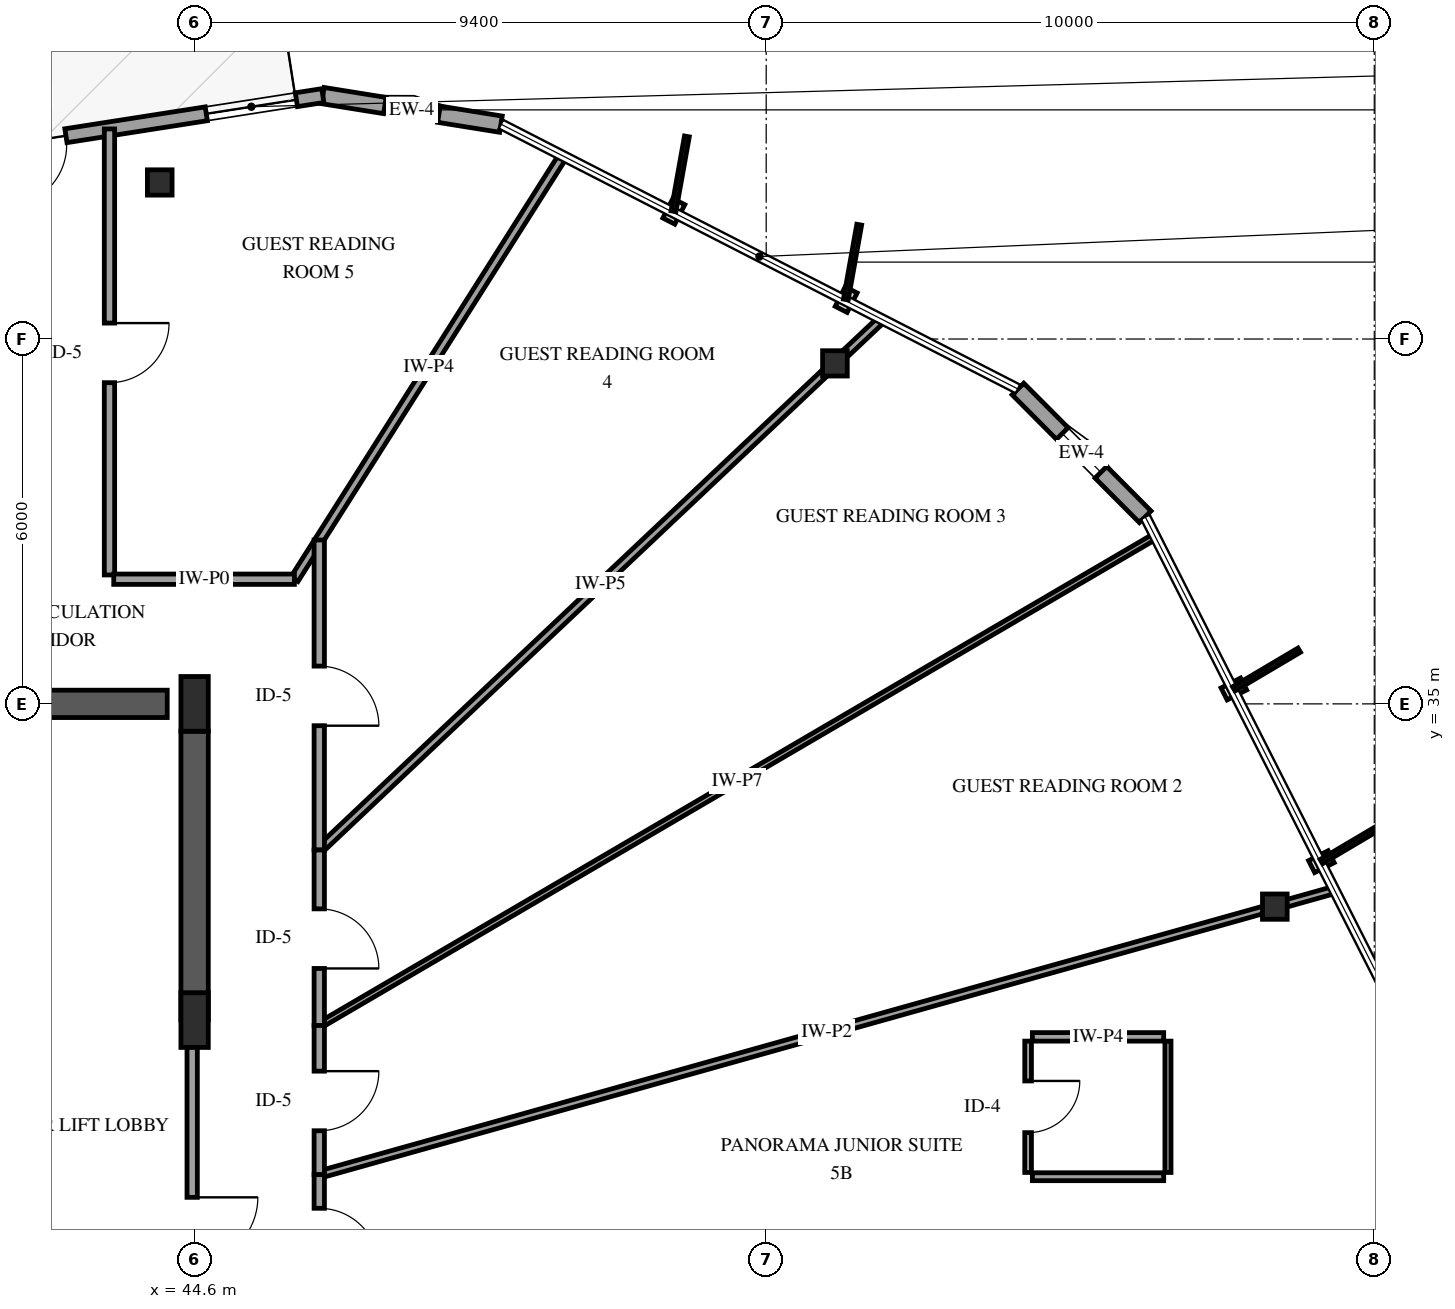
"""IFC4 building model, lengths in metres.
Left out: names, types, materials, properties, quantities, classifications, styles, units other than length and angle.
Written with IfcOpenShell. Run it as: python <this file> out.ifc"""

import sys

from ifc_helpers import new_model, si_unit, direction, frame, frame_2d, origin, origin_2d, place, context, subcontext, project, spatial, rectangle, i_section, extrude, element, fill, save


model = new_model("IFC4")
c1 = context("Model", 3, precision=1e-05, world=origin(), true_north=direction((0.0, 1.0)))
c2 = subcontext(c1, "Body", "Model", "MODEL_VIEW")
j1 = project(units=[si_unit("LENGTHUNIT", "METRE"), si_unit("PLANEANGLEUNIT", "RADIAN")], contexts=[c1])
p1 = place(None, origin())
s1 = spatial("IfcSite", under=j1, at=p1, CompositionType="ELEMENT")
p2 = place(p1, origin())
s2 = spatial("IfcBuilding", under=s1, at=p2, CompositionType="ELEMENT")
p3 = place(p2, frame((0.0, 0.0, 197.8)))
s3 = spatial("IfcBuildingStorey", under=s2, at=p3, CompositionType="ELEMENT", Elevation=197.8)
p4 = place(p3, frame((41.3, 35.0, 0.0), z_axis=(0.0, 0.0, 1.0), x_axis=(1.0, 0.0, 0.0)))
e1 = element("IfcWall", 1, at=p4, inside=s3, PredefinedType="SHEAR", context=c2, shape_type="SweptSolid", body=[
    extrude(rectangle(XDim=2.85, YDim=0.45, at=frame_2d((1.425, 0.0))), origin(), (0.0, 0.0, 1.0), 3.6),
])
p5 = place(p3, frame((44.6, 29.8, 0.0), z_axis=(0.0, 0.0, 1.0), x_axis=(0.0, 1.0, 0.0)))
e2 = element("IfcWall", 2, at=p5, inside=s3, PredefinedType="SHEAR", context=c2, shape_type="SweptSolid", body=[
    extrude(rectangle(XDim=4.75, YDim=0.45, at=frame_2d((2.375, 0.0))), origin(), (0.0, 0.0, 1.0), 3.6),
])
for number, where, z_axis, x_axis in (
    (3, (44.6, 29.8, 0.0), (0.0, 0.0, 1.0), (1.0, 0.0, 0.0)),
    (4, (44.6, 35.0, 0.0), (0.0, 0.0, 1.0), (1.0, 0.0, 0.0)),
):
    element("IfcColumn", number, at=place(p3, frame(where, z_axis=z_axis, x_axis=x_axis)), inside=s3, PredefinedType="PILASTER", context=c2, shape_type="SweptSolid", body=[
        extrude(rectangle(XDim=0.45, YDim=0.9, at=origin_2d()), origin(), (0.0, 0.0, 1.0), 3.6),
    ])
for number, where, z_axis, x_axis in (
    (5, (62.365, 31.666, 0.0), (0.0, 0.0, 1.0), (1.0, 0.0, 0.0)),
    (6, (55.13, 40.599, 0.0), (0.0, 0.0, 1.0), (1.0, 0.0, 0.0)),
    (7, (44.027, 43.574, 0.0), (0.0, 0.0, 1.0), (1.0, 0.0, 0.0)),
):
    element("IfcColumn", number, at=place(p3, frame(where, z_axis=z_axis, x_axis=x_axis)), inside=s3, PredefinedType="COLUMN", context=c2, shape_type="SweptSolid", body=[
        extrude(i_section(OverallWidth=0.406, OverallDepth=0.416, WebThickness=0.03, FlangeThickness=0.048, FilletRadius=0.038, at=origin_2d()), origin(), (0.0, 0.0, 1.0), 3.6),
    ])
p6 = place(p3, frame((49.638, 44.533, 0.0), z_axis=(0.0, 0.0, 1.0), x_axis=(-0.987357295895, 0.158510473609, 0.0)))
e8 = element("IfcWall", 8, at=p6, inside=s3, PredefinedType="SOLIDWALL", context=c2, shape_type="SweptSolid", body=[
    extrude(rectangle(XDim=2.967, YDim=0.27, at=frame_2d((1.483, 0.0))), origin(), (0.0, 0.0, 1.0), 2.679),
])
p7 = place(p6, frame((1.033, 0.0, 0.75)))
e9 = element("IfcOpeningElement", 9, at=p7, cuts=e8, PredefinedType="OPENING", context=c2, shape_type="SweptSolid", body=[
    extrude(rectangle(XDim=0.9, YDim=1.5, at=frame_2d((0.45, 0.75))), frame((0.0, 0.145, 0.0), z_axis=(0.0, -1.0, 0.0), x_axis=(1.0, 0.0, 0.0)), (0.0, 0.0, 1.0), 0.29),
])
p8 = place(p3, frame((46.709, 45.003, 0.0), z_axis=(0.0, 0.0, 1.0), x_axis=(-0.988013251918, -0.154369083801, 0.0)))
e10 = element("IfcWall", 10, at=p8, inside=s3, PredefinedType="SOLIDWALL", context=c2, shape_type="SweptSolid", body=[
    extrude(rectangle(XDim=9.552, YDim=0.23, at=frame_2d((4.776, 0.0))), origin(), (0.0, 0.0, 1.0), 2.679),
])
p9 = place(p8, frame((4.276, 0.0, 0.0)))
e11 = element("IfcOpeningElement", 11, at=p9, cuts=e10, PredefinedType="OPENING", context=c2, shape_type="SweptSolid", body=[
    extrude(rectangle(XDim=1.0, YDim=2.15, at=frame_2d((0.5, 1.075))), frame((0.0, 0.125, 0.0), z_axis=(0.0, -1.0, 0.0), x_axis=(1.0, 0.0, 0.0)), (0.0, 0.0, 1.0), 0.25),
])
p10 = place(p8, frame((0.44, 0.0, 0.72)))
e12 = element("IfcOpeningElement", 12, at=p10, cuts=e10, PredefinedType="OPENING", context=c2, shape_type="SweptSolid", body=[
    extrude(rectangle(XDim=1.5, YDim=1.7, at=frame_2d((0.75, 0.85))), frame((0.0, 0.125, 0.0), z_axis=(0.0, -1.0, 0.0), x_axis=(1.0, 0.0, 0.0)), (0.0, 0.0, 1.0), 0.25),
])
p11 = place(p8, frame((6.058, 0.0, 0.72)))
e13 = element("IfcOpeningElement", 13, at=p11, cuts=e10, PredefinedType="OPENING", context=c2, shape_type="SweptSolid", body=[
    extrude(rectangle(XDim=1.5, YDim=1.7, at=frame_2d((0.75, 0.85))), frame((0.0, 0.125, 0.0), z_axis=(0.0, -1.0, 0.0), x_axis=(1.0, 0.0, 0.0)), (0.0, 0.0, 1.0), 0.25),
])
p12 = place(p3, frame((63.496, 17.193, 0.0), z_axis=(0.0, 0.0, 1.0), x_axis=(0.158485894053, 0.987361241586, 0.0)))
e14 = element("IfcWall", 14, at=p12, inside=s3, PredefinedType="SOLIDWALL", context=c2, shape_type="SweptSolid", body=[
    extrude(rectangle(XDim=9.552, YDim=0.23, at=frame_2d((4.776, 0.0))), origin(), (0.0, 0.0, 1.0), 2.679),
])
p13 = place(p12, frame((4.276, 0.0, 0.0)))
e15 = element("IfcOpeningElement", 15, at=p13, cuts=e14, PredefinedType="OPENING", context=c2, shape_type="SweptSolid", body=[
    extrude(rectangle(XDim=1.0, YDim=2.15, at=frame_2d((0.5, 1.075))), frame((0.0, 0.125, 0.0), z_axis=(0.0, -1.0, 0.0), x_axis=(1.0, 0.0, 0.0)), (0.0, 0.0, 1.0), 0.25),
])
p14 = place(p12, frame((0.44, 0.0, 0.72)))
e16 = element("IfcOpeningElement", 16, at=p14, cuts=e14, PredefinedType="OPENING", context=c2, shape_type="SweptSolid", body=[
    extrude(rectangle(XDim=1.5, YDim=1.7, at=frame_2d((0.75, 0.85))), frame((0.0, 0.125, 0.0), z_axis=(0.0, -1.0, 0.0), x_axis=(1.0, 0.0, 0.0)), (0.0, 0.0, 1.0), 0.25),
])
p15 = place(p12, frame((5.916, 0.0, 0.72)))
e17 = element("IfcOpeningElement", 17, at=p15, cuts=e14, PredefinedType="OPENING", context=c2, shape_type="SweptSolid", body=[
    extrude(rectangle(XDim=1.5, YDim=1.7, at=frame_2d((0.75, 0.85))), frame((0.0, 0.125, 0.0), z_axis=(0.0, -1.0, 0.0), x_axis=(1.0, 0.0, 0.0)), (0.0, 0.0, 1.0), 0.25),
])
p16 = place(p3, frame((60.233, 38.076, 0.0), z_axis=(0.0, 0.0, 1.0), x_axis=(-0.705623863774, 0.708586595183, 0.0)))
e18 = element("IfcWall", 18, at=p16, inside=s3, PredefinedType="SOLIDWALL", context=c2, shape_type="SweptSolid", body=[
    extrude(rectangle(XDim=2.967, YDim=0.27, at=frame_2d((1.483, 0.0))), origin(), (0.0, 0.0, 1.0), 2.679),
])
p17 = place(p16, frame((1.033, 0.0, 0.75)))
e19 = element("IfcOpeningElement", 19, at=p17, cuts=e18, PredefinedType="OPENING", context=c2, shape_type="SweptSolid", body=[
    extrude(rectangle(XDim=0.9, YDim=1.5, at=frame_2d((0.45, 0.75))), frame((0.0, 0.145, 0.0), z_axis=(0.0, -1.0, 0.0), x_axis=(1.0, 0.0, 0.0)), (0.0, 0.0, 1.0), 0.29),
])
p18 = place(p3, frame((46.65, 27.258, 0.0), z_axis=(0.0, 0.0, 1.0), x_axis=(0.962851035854, 0.270033114181, 0.0)))
e20 = element("IfcWall", 20, at=p18, inside=s3, PredefinedType="PARTITIONING", context=c2, shape_type="SweptSolid", body=[
    extrude(rectangle(XDim=17.338, YDim=0.12, at=frame_2d((8.669, 0.0))), origin(), (0.0, 0.0, 1.0), 3.3),
])
p19 = place(p3, frame((46.65, 29.711, 0.0), z_axis=(0.0, 0.0, 1.0), x_axis=(0.863084226083, 0.505060014936, 0.0)))
e21 = element("IfcWall", 21, at=p19, inside=s3, PredefinedType="PARTITIONING", context=c2, shape_type="SweptSolid", body=[
    extrude(rectangle(XDim=15.927, YDim=0.1, at=frame_2d((7.963, 0.0))), origin(), (0.0, 0.0, 1.0), 3.3),
])
p20 = place(p3, frame((46.65, 32.597, 0.0), z_axis=(0.0, 0.0, 1.0), x_axis=(0.727292042889, 0.68632811712, 0.0)))
e22 = element("IfcWall", 22, at=p20, inside=s3, PredefinedType="PARTITIONING", context=c2, shape_type="SweptSolid", body=[
    extrude(rectangle(XDim=12.719, YDim=0.13, at=frame_2d((6.359, 0.0))), origin(), (0.0, 0.0, 1.0), 2.595),
])
p21 = place(p3, frame((46.241, 37.05, 0.0), z_axis=(0.0, 0.0, 1.0), x_axis=(0.535694507072, 0.844411863425, 0.0)))
e23 = element("IfcWall", 23, at=p21, inside=s3, PredefinedType="PARTITIONING", context=c2, shape_type="SweptSolid", body=[
    extrude(rectangle(XDim=8.244, YDim=0.14, at=frame_2d((4.122, 0.0))), origin(), (0.0, 0.0, 1.0), 3.3),
])
p22 = place(p3, frame((43.2, 44.455, 0.0), z_axis=(0.0, 0.0, 1.0), x_axis=(0.0, -1.0, 0.0)))
e24 = element("IfcWall", 24, at=p22, inside=s3, PredefinedType="PARTITIONING", context=c2, shape_type="SweptSolid", body=[
    extrude(rectangle(XDim=7.335, YDim=0.17, at=frame_2d((3.667, 0.0))), origin(), (0.0, 0.0, 1.0), 2.595),
])
p23 = place(p22, frame((3.193, 0.0, 0.0)))
e25 = element("IfcOpeningElement", 25, at=p23, cuts=e24, PredefinedType="OPENING", context=c2, shape_type="SweptSolid", body=[
    extrude(rectangle(XDim=0.98, YDim=2.15, at=frame_2d((0.49, 1.075))), frame((0.0, 0.095, 0.0), z_axis=(0.0, -1.0, 0.0), x_axis=(1.0, 0.0, 0.0)), (0.0, 0.0, 1.0), 0.19),
])
p24 = place(p3, frame((44.56, 29.8, 0.0), z_axis=(0.0, 0.0, 1.0), x_axis=(0.0, -1.0, 0.0)))
e26 = element("IfcWall", 26, at=p24, inside=s3, PredefinedType="PARTITIONING", context=c2, shape_type="SweptSolid", body=[
    extrude(rectangle(XDim=6.91, YDim=0.17, at=frame_2d((3.455, 0.0))), origin(), (0.0, 0.0, 1.0), 2.34),
])
p25 = place(p24, frame((2.915, 0.0, 0.0)))
e27 = element("IfcOpeningElement", 27, at=p25, cuts=e26, PredefinedType="OPENING", context=c2, shape_type="SweptSolid", body=[
    extrude(rectangle(XDim=1.08, YDim=2.15, at=frame_2d((0.54, 1.075))), frame((0.0, 0.095, 0.0), z_axis=(0.0, -1.0, 0.0), x_axis=(1.0, 0.0, 0.0)), (0.0, 0.0, 1.0), 0.19),
])
p26 = place(p3, frame((46.65, 37.695, 0.0), z_axis=(0.0, 0.0, 1.0), x_axis=(0.0, -1.0, 0.0)))
e28 = element("IfcWall", 28, at=p26, inside=s3, PredefinedType="PARTITIONING", context=c2, shape_type="SweptSolid", body=[
    extrude(rectangle(XDim=5.098, YDim=0.17, at=frame_2d((2.549, 0.0))), origin(), (0.0, 0.0, 1.0), 3.3),
])
p27 = place(p26, frame((2.074, 0.0, 0.0)))
e29 = element("IfcOpeningElement", 29, at=p27, cuts=e28, PredefinedType="OPENING", context=c2, shape_type="SweptSolid", body=[
    extrude(rectangle(XDim=0.98, YDim=2.15, at=frame_2d((0.49, 1.075))), frame((0.0, 0.095, 0.0), z_axis=(0.0, -1.0, 0.0), x_axis=(1.0, 0.0, 0.0)), (0.0, 0.0, 1.0), 0.19),
])
p28 = place(p3, frame((43.27, 37.05, 0.0), z_axis=(0.0, 0.0, 1.0), x_axis=(1.0, 0.0, 0.0)))
e30 = element("IfcWall", 30, at=p28, inside=s3, PredefinedType="PARTITIONING", context=c2, shape_type="SweptSolid", body=[
    extrude(rectangle(XDim=2.971, YDim=0.17, at=frame_2d((1.485, 0.0))), origin(), (0.0, 0.0, 1.0), 3.3),
])
p29 = place(p3, frame((46.65, 32.597, 0.0), z_axis=(0.0, 0.0, 1.0), x_axis=(0.0, -1.0, 0.0)))
e31 = element("IfcWall", 31, at=p29, inside=s3, PredefinedType="PARTITIONING", context=c2, shape_type="SweptSolid", body=[
    extrude(rectangle(XDim=2.886, YDim=0.17, at=frame_2d((1.443, 0.0))), origin(), (0.0, 0.0, 1.0), 3.3),
])
p30 = place(p29, frame((0.968, 0.0, 0.0)))
e32 = element("IfcOpeningElement", 32, at=p30, cuts=e31, PredefinedType="OPENING", context=c2, shape_type="SweptSolid", body=[
    extrude(rectangle(XDim=0.98, YDim=2.15, at=frame_2d((0.49, 1.075))), frame((0.0, 0.095, 0.0), z_axis=(0.0, -1.0, 0.0), x_axis=(1.0, 0.0, 0.0)), (0.0, 0.0, 1.0), 0.19),
])
p31 = place(p3, frame((46.65, 29.711, 0.0), z_axis=(0.0, 0.0, 1.0), x_axis=(0.0, -1.0, 0.0)))
e33 = element("IfcWall", 33, at=p31, inside=s3, PredefinedType="PARTITIONING", context=c2, shape_type="SweptSolid", body=[
    extrude(rectangle(XDim=2.453, YDim=0.17, at=frame_2d((1.227, 0.0))), origin(), (0.0, 0.0, 1.0), 3.3),
])
p32 = place(p31, frame((0.751, 0.0, 0.0)))
e34 = element("IfcOpeningElement", 34, at=p32, cuts=e33, PredefinedType="OPENING", context=c2, shape_type="SweptSolid", body=[
    extrude(rectangle(XDim=0.98, YDim=2.15, at=frame_2d((0.49, 1.075))), frame((0.0, 0.095, 0.0), z_axis=(0.0, -1.0, 0.0), x_axis=(1.0, 0.0, 0.0)), (0.0, 0.0, 1.0), 0.19),
])
p33 = place(p3, frame((58.307, 29.454, 0.0), z_axis=(0.0, 0.0, 1.0), x_axis=(0.0, -1.0, 0.0)))
e35 = element("IfcWall", 35, at=p33, inside=s3, PredefinedType="PARTITIONING", context=c2, shape_type="SweptSolid", body=[
    extrude(rectangle(XDim=2.16, YDim=0.11, at=frame_2d((1.08, 0.0))), origin(), (0.0, 0.0, 1.0), 3.3),
])
p34 = place(p33, frame((0.655, 0.0, 0.0)))
e36 = element("IfcOpeningElement", 36, at=p34, cuts=e35, PredefinedType="OPENING", context=c2, shape_type="SweptSolid", body=[
    extrude(rectangle(XDim=0.85, YDim=2.1, at=frame_2d((0.425, 1.05))), frame((0.0, 0.065, 0.0), z_axis=(0.0, -1.0, 0.0), x_axis=(1.0, 0.0, 0.0)), (0.0, 0.0, 1.0), 0.13),
])
p35 = place(p3, frame((60.607, 27.294, 0.0), z_axis=(0.0, 0.0, 1.0), x_axis=(0.0, 1.0, 0.0)))
e37 = element("IfcWall", 37, at=p35, inside=s3, PredefinedType="PARTITIONING", context=c2, shape_type="SweptSolid", body=[
    extrude(rectangle(XDim=2.16, YDim=0.1, at=frame_2d((1.08, 0.0))), origin(), (0.0, 0.0, 1.0), 3.3),
])
p36 = place(p3, frame((60.537, 29.524, 0.0), z_axis=(0.0, 0.0, 1.0), x_axis=(-1.0, 0.0, 0.0)))
e38 = element("IfcWall", 38, at=p36, inside=s3, PredefinedType="PARTITIONING", context=c2, shape_type="SweptSolid", body=[
    extrude(rectangle(XDim=2.16, YDim=0.14, at=frame_2d((1.08, 0.0))), origin(), (0.0, 0.0, 1.0), 3.3),
])
p37 = place(p3, frame((58.377, 27.224, 0.0), z_axis=(0.0, 0.0, 1.0), x_axis=(1.0, 0.0, 0.0)))
e39 = element("IfcWall", 39, at=p37, inside=s3, PredefinedType="PARTITIONING", context=c2, shape_type="SweptSolid", body=[
    extrude(rectangle(XDim=2.16, YDim=0.13, at=frame_2d((1.08, 0.0))), origin(), (0.0, 0.0, 1.0), 3.3),
])
p38 = place(p3, frame((46.65, 27.258, 0.0), z_axis=(0.0, 0.0, 1.0), x_axis=(0.0, -1.0, 0.0)))
e40 = element("IfcWall", 40, at=p38, inside=s3, PredefinedType="PARTITIONING", context=c2, shape_type="SweptSolid", body=[
    extrude(rectangle(XDim=2.056, YDim=0.17, at=frame_2d((1.028, 0.0))), origin(), (0.0, 0.0, 1.0), 3.3),
])
p39 = place(p38, frame((0.553, 0.0, 0.0)))
e41 = element("IfcOpeningElement", 41, at=p39, cuts=e40, PredefinedType="OPENING", context=c2, shape_type="SweptSolid", body=[
    extrude(rectangle(XDim=0.98, YDim=2.15, at=frame_2d((0.49, 1.075))), frame((0.0, 0.095, 0.0), z_axis=(0.0, -1.0, 0.0), x_axis=(1.0, 0.0, 0.0)), (0.0, 0.0, 1.0), 0.19),
])
p40 = place(p7, origin())
e42 = element("IfcWindow", 42, at=p40, inside=s3, PartitioningType="SINGLE_PANEL", PredefinedType="WINDOW", context=c2, shape_type="SweptSolid", body=[
    extrude(rectangle(XDim=0.9, YDim=1.5, at=frame_2d((0.45, 0.75))), frame((0.0, 0.03, 0.0), z_axis=(0.0, -1.0, 0.0), x_axis=(1.0, 0.0, 0.0)), (0.0, 0.0, 1.0), 0.06),
])
fill(e9, e42)
p41 = place(p9, origin())
e43 = element("IfcDoor", 43, at=p41, inside=s3, OperationType="SINGLE_SWING_RIGHT", PredefinedType="DOOR", context=c2, shape_type="SweptSolid", body=[
    extrude(rectangle(XDim=1.0, YDim=2.15, at=frame_2d((0.5, 1.075))), frame((0.0, 0.025, 0.0), z_axis=(0.0, -1.0, 0.0), x_axis=(1.0, 0.0, 0.0)), (0.0, 0.0, 1.0), 0.05),
])
fill(e11, e43)
p42 = place(p10, origin())
e44 = element("IfcWindow", 44, at=p42, inside=s3, PartitioningType="SINGLE_PANEL", PredefinedType="WINDOW", context=c2, shape_type="SweptSolid", body=[
    extrude(rectangle(XDim=1.5, YDim=1.7, at=frame_2d((0.75, 0.85))), frame((0.0, 0.03, 0.0), z_axis=(0.0, -1.0, 0.0), x_axis=(1.0, 0.0, 0.0)), (0.0, 0.0, 1.0), 0.06),
])
fill(e12, e44)
p43 = place(p17, origin())
e45 = element("IfcWindow", 45, at=p43, inside=s3, PartitioningType="SINGLE_PANEL", PredefinedType="WINDOW", context=c2, shape_type="SweptSolid", body=[
    extrude(rectangle(XDim=0.9, YDim=1.5, at=frame_2d((0.45, 0.75))), frame((0.0, 0.03, 0.0), z_axis=(0.0, -1.0, 0.0), x_axis=(1.0, 0.0, 0.0)), (0.0, 0.0, 1.0), 0.06),
])
fill(e19, e45)
p44 = place(p23, origin())
e46 = element("IfcDoor", 46, at=p44, inside=s3, OperationType="SINGLE_SWING_LEFT", PredefinedType="DOOR", context=c2, shape_type="SweptSolid", body=[
    extrude(rectangle(XDim=0.98, YDim=2.15, at=frame_2d((0.49, 1.075))), frame((0.0, 0.025, 0.0), z_axis=(0.0, -1.0, 0.0), x_axis=(1.0, 0.0, 0.0)), (0.0, 0.0, 1.0), 0.05),
])
fill(e25, e46)
p45 = place(p25, origin())
e47 = element("IfcDoor", 47, at=p45, inside=s3, OperationType="SINGLE_SWING_LEFT", PredefinedType="DOOR", context=c2, shape_type="SweptSolid", body=[
    extrude(rectangle(XDim=1.08, YDim=2.15, at=frame_2d((0.54, 1.075))), frame((0.0, 0.025, 0.0), z_axis=(0.0, -1.0, 0.0), x_axis=(1.0, 0.0, 0.0)), (0.0, 0.0, 1.0), 0.05),
])
fill(e27, e47)
p46 = place(p27, origin())
e48 = element("IfcDoor", 48, at=p46, inside=s3, OperationType="SINGLE_SWING_RIGHT", PredefinedType="DOOR", context=c2, shape_type="SweptSolid", body=[
    extrude(rectangle(XDim=0.98, YDim=2.15, at=frame_2d((0.49, 1.075))), frame((0.0, 0.025, 0.0), z_axis=(0.0, -1.0, 0.0), x_axis=(1.0, 0.0, 0.0)), (0.0, 0.0, 1.0), 0.05),
])
fill(e29, e48)
p47 = place(p30, origin())
e49 = element("IfcDoor", 49, at=p47, inside=s3, OperationType="SINGLE_SWING_RIGHT", PredefinedType="DOOR", context=c2, shape_type="SweptSolid", body=[
    extrude(rectangle(XDim=0.98, YDim=2.15, at=frame_2d((0.49, 1.075))), frame((0.0, 0.025, 0.0), z_axis=(0.0, -1.0, 0.0), x_axis=(1.0, 0.0, 0.0)), (0.0, 0.0, 1.0), 0.05),
])
fill(e32, e49)
p48 = place(p32, origin())
e50 = element("IfcDoor", 50, at=p48, inside=s3, OperationType="SINGLE_SWING_LEFT", PredefinedType="DOOR", context=c2, shape_type="SweptSolid", body=[
    extrude(rectangle(XDim=0.98, YDim=2.15, at=frame_2d((0.49, 1.075))), frame((0.0, 0.025, 0.0), z_axis=(0.0, -1.0, 0.0), x_axis=(1.0, 0.0, 0.0)), (0.0, 0.0, 1.0), 0.05),
])
fill(e34, e50)
p49 = place(p34, origin())
e51 = element("IfcDoor", 51, at=p49, inside=s3, OperationType="SINGLE_SWING_LEFT", PredefinedType="DOOR", context=c2, shape_type="SweptSolid", body=[
    extrude(rectangle(XDim=0.85, YDim=2.1, at=frame_2d((0.425, 1.05))), frame((0.0, 0.025, 0.0), z_axis=(0.0, -1.0, 0.0), x_axis=(1.0, 0.0, 0.0)), (0.0, 0.0, 1.0), 0.05),
])
fill(e36, e51)
p50 = place(p39, origin())
e52 = element("IfcDoor", 52, at=p50, inside=s3, OperationType="SINGLE_SWING_RIGHT", PredefinedType="DOOR", context=c2, shape_type="SweptSolid", body=[
    extrude(rectangle(XDim=0.98, YDim=2.15, at=frame_2d((0.49, 1.075))), frame((0.0, 0.025, 0.0), z_axis=(0.0, -1.0, 0.0), x_axis=(1.0, 0.0, 0.0)), (0.0, 0.0, 1.0), 0.05),
])
fill(e41, e52)
save(model, sys.argv[1])
